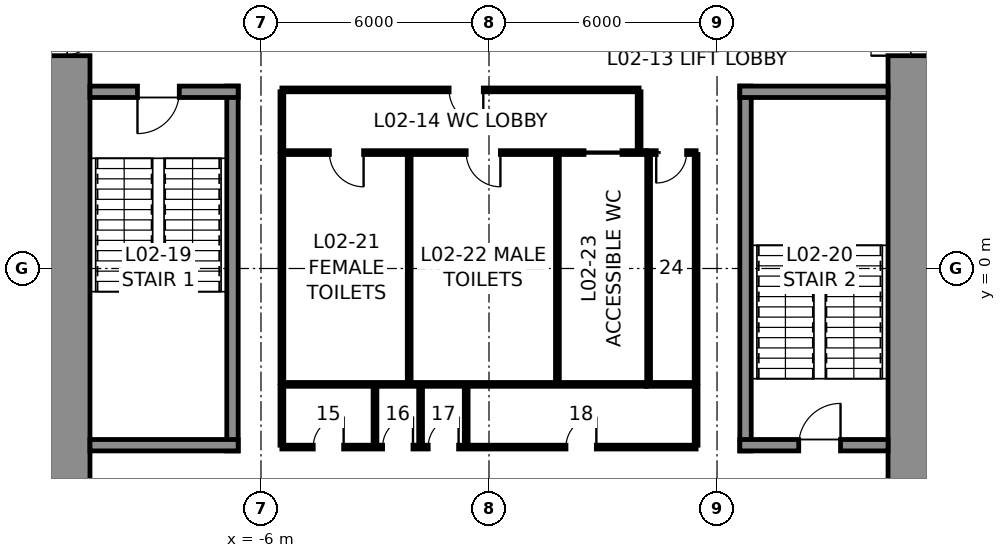
"""IFC4 building model, lengths in metres.
Left out: names, types, materials, properties, quantities, classifications, styles, units other than length and angle.
Written with IfcOpenShell. Run it as: python <this file> out.ifc"""

import sys

from ifc_helpers import new_model, si_unit, direction, frame, frame_2d, origin, place, context, subcontext, project, spatial, rectangle, extrude, element, fill, save


model = new_model("IFC4")
c1 = context("Model", 3, precision=1e-05, world=origin(), true_north=direction((0.0, 1.0)))
c2 = subcontext(c1, "Body", "Model", "MODEL_VIEW")
j1 = project(units=[si_unit("LENGTHUNIT", "METRE"), si_unit("PLANEANGLEUNIT", "RADIAN")], contexts=[c1])
p1 = place(None, origin())
s1 = spatial("IfcSite", under=j1, at=p1, CompositionType="ELEMENT")
p2 = place(p1, origin())
s2 = spatial("IfcBuilding", under=s1, at=p2, CompositionType="ELEMENT")
p3 = place(p2, frame((0.0, 0.0, 11.0)))
s3 = spatial("IfcBuildingStorey", under=s2, at=p3, CompositionType="ELEMENT", Elevation=11.0)
p4 = place(p3, frame((11.25, 10.5, 0.0), z_axis=(0.0, 0.0, 1.0), x_axis=(0.0, -1.0, 0.0)))
e1 = element("IfcWall", 1, at=p4, inside=s3, PredefinedType="SHEAR", context=c2, shape_type="SweptSolid", body=[
    extrude(rectangle(XDim=21.0, YDim=1.5, at=frame_2d((10.5, 0.0))), origin(), (0.0, 0.0, 1.0), 5.0),
])
p5 = place(p4, frame((3.7, 0.0, 0.0)))
e2 = element("IfcOpeningElement", 2, at=p5, cuts=e1, PredefinedType="OPENING", context=c2, shape_type="SweptSolid", body=[
    extrude(rectangle(XDim=1.2, YDim=2.3, at=frame_2d((0.6, 1.15))), frame((0.0, 0.76, 0.0), z_axis=(0.0, -1.0, 0.0), x_axis=(1.0, 0.0, 0.0)), (0.0, 0.0, 1.0), 1.52),
])
p6 = place(p4, frame((16.1, 0.0, 0.0)))
e3 = element("IfcOpeningElement", 3, at=p6, cuts=e1, PredefinedType="OPENING", context=c2, shape_type="SweptSolid", body=[
    extrude(rectangle(XDim=1.2, YDim=2.3, at=frame_2d((0.6, 1.15))), frame((0.0, 0.76, 0.0), z_axis=(0.0, -1.0, 0.0), x_axis=(1.0, 0.0, 0.0)), (0.0, 0.0, 1.0), 1.52),
])
p7 = place(p3, frame((-11.25, -10.5, 0.0), z_axis=(0.0, 0.0, 1.0), x_axis=(0.0, 1.0, 0.0)))
e4 = element("IfcWall", 4, at=p7, inside=s3, PredefinedType="SHEAR", context=c2, shape_type="SweptSolid", body=[
    extrude(rectangle(XDim=21.0, YDim=1.5, at=frame_2d((10.5, 0.0))), origin(), (0.0, 0.0, 1.0), 5.0),
])
p8 = place(p7, frame((16.1, 0.0, 0.0)))
e5 = element("IfcOpeningElement", 5, at=p8, cuts=e4, PredefinedType="OPENING", context=c2, shape_type="SweptSolid", body=[
    extrude(rectangle(XDim=1.2, YDim=2.3, at=frame_2d((0.6, 1.15))), frame((0.0, 0.76, 0.0), z_axis=(0.0, -1.0, 0.0), x_axis=(1.0, 0.0, 0.0)), (0.0, 0.0, 1.0), 1.52),
])
p9 = place(p7, frame((3.7, 0.0, 0.0)))
e6 = element("IfcOpeningElement", 6, at=p9, cuts=e4, PredefinedType="OPENING", context=c2, shape_type="SweptSolid", body=[
    extrude(rectangle(XDim=1.2, YDim=2.3, at=frame_2d((0.6, 1.15))), frame((0.0, 0.76, 0.0), z_axis=(0.0, -1.0, 0.0), x_axis=(1.0, 0.0, 0.0)), (0.0, 0.0, 1.0), 1.52),
])
p10 = place(p3, frame((-6.75, -4.8, 0.0), z_axis=(0.0, 0.0, 1.0), x_axis=(0.0, 1.0, 0.0)))
e7 = element("IfcWall", 7, at=p10, inside=s3, PredefinedType="SOLIDWALL", context=c2, shape_type="SweptSolid", body=[
    extrude(rectangle(XDim=9.6, YDim=0.3, at=frame_2d((4.8, 0.0))), origin(), (0.0, 0.0, 1.0), 4.75),
])
p11 = place(p3, frame((-10.5, 4.65, 0.0), z_axis=(0.0, 0.0, 1.0), x_axis=(1.0, 0.0, 0.0)))
e8 = element("IfcWall", 8, at=p11, inside=s3, PredefinedType="SOLIDWALL", context=c2, shape_type="SweptSolid", body=[
    extrude(rectangle(XDim=3.9, YDim=0.3, at=frame_2d((1.95, 0.0))), origin(), (0.0, 0.0, 1.0), 4.75),
])
p12 = place(p11, frame((1.25, 0.0, 0.0)))
e9 = element("IfcOpeningElement", 9, at=p12, cuts=e8, PredefinedType="OPENING", context=c2, shape_type="SweptSolid", body=[
    extrude(rectangle(XDim=1.1, YDim=2.3, at=frame_2d((0.55, 1.15))), frame((0.0, 0.16, 0.0), z_axis=(0.0, -1.0, 0.0), x_axis=(1.0, 0.0, 0.0)), (0.0, 0.0, 1.0), 0.32),
])
p13 = place(p3, frame((-6.6, -4.65, 0.0), z_axis=(0.0, 0.0, 1.0), x_axis=(-1.0, 0.0, 0.0)))
e10 = element("IfcWall", 10, at=p13, inside=s3, PredefinedType="SOLIDWALL", context=c2, shape_type="SweptSolid", body=[
    extrude(rectangle(XDim=3.9, YDim=0.3, at=frame_2d((1.95, 0.0))), origin(), (0.0, 0.0, 1.0), 4.75),
])
p14 = place(p3, frame((6.75, -4.8, 0.0), z_axis=(0.0, 0.0, 1.0), x_axis=(0.0, 1.0, 0.0)))
e11 = element("IfcWall", 11, at=p14, inside=s3, PredefinedType="SOLIDWALL", context=c2, shape_type="SweptSolid", body=[
    extrude(rectangle(XDim=9.6, YDim=0.3, at=frame_2d((4.8, 0.0))), origin(), (0.0, 0.0, 1.0), 4.75),
])
p15 = place(p3, frame((6.6, 4.65, 0.0), z_axis=(0.0, 0.0, 1.0), x_axis=(1.0, 0.0, 0.0)))
e12 = element("IfcWall", 12, at=p15, inside=s3, PredefinedType="SOLIDWALL", context=c2, shape_type="SweptSolid", body=[
    extrude(rectangle(XDim=3.9, YDim=0.3, at=frame_2d((1.95, 0.0))), origin(), (0.0, 0.0, 1.0), 4.75),
])
p16 = place(p3, frame((10.5, -4.65, 0.0), z_axis=(0.0, 0.0, 1.0), x_axis=(-1.0, 0.0, 0.0)))
e13 = element("IfcWall", 13, at=p16, inside=s3, PredefinedType="SOLIDWALL", context=c2, shape_type="SweptSolid", body=[
    extrude(rectangle(XDim=3.9, YDim=0.3, at=frame_2d((1.95, 0.0))), origin(), (0.0, 0.0, 1.0), 4.75),
])
p17 = place(p16, frame((1.25, 0.0, 0.0)))
e14 = element("IfcOpeningElement", 14, at=p17, cuts=e13, PredefinedType="OPENING", context=c2, shape_type="SweptSolid", body=[
    extrude(rectangle(XDim=1.1, YDim=2.3, at=frame_2d((0.55, 1.15))), frame((0.0, 0.16, 0.0), z_axis=(0.0, -1.0, 0.0), x_axis=(1.0, 0.0, 0.0)), (0.0, 0.0, 1.0), 0.32),
])
p18 = place(p3, frame((-5.45, 3.05, 0.0), z_axis=(0.0, 0.0, 1.0), x_axis=(1.0, 0.0, 0.0)))
e15 = element("IfcWall", 15, at=p18, inside=s3, PredefinedType="PARTITIONING", context=c2, shape_type="SweptSolid", body=[
    extrude(rectangle(XDim=9.6, YDim=0.1, at=frame_2d((4.8, 0.0))), origin(), (0.0, 0.0, 1.0), 4.75),
])
p19 = place(p18, frame((1.25, 0.0, 0.0)))
e16 = element("IfcOpeningElement", 16, at=p19, cuts=e15, PredefinedType="OPENING", context=c2, shape_type="SweptSolid", body=[
    extrude(rectangle(XDim=0.9, YDim=2.3, at=frame_2d((0.45, 1.15))), frame((0.0, 0.06, 0.0), z_axis=(0.0, -1.0, 0.0), x_axis=(1.0, 0.0, 0.0)), (0.0, 0.0, 1.0), 0.12),
])
p20 = place(p18, frame((4.85, 0.0, 0.0)))
e17 = element("IfcOpeningElement", 17, at=p20, cuts=e15, PredefinedType="OPENING", context=c2, shape_type="SweptSolid", body=[
    extrude(rectangle(XDim=0.9, YDim=2.3, at=frame_2d((0.45, 1.15))), frame((0.0, 0.06, 0.0), z_axis=(0.0, -1.0, 0.0), x_axis=(1.0, 0.0, 0.0)), (0.0, 0.0, 1.0), 0.12),
])
p21 = place(p18, frame((7.95, 0.0, 0.0)))
e18 = element("IfcOpeningElement", 18, at=p21, cuts=e15, PredefinedType="OPENING", context=c2, shape_type="SweptSolid", body=[
    extrude(rectangle(XDim=1.0, YDim=2.3, at=frame_2d((0.5, 1.15))), frame((0.0, 0.06, 0.0), z_axis=(0.0, -1.0, 0.0), x_axis=(1.0, 0.0, 0.0)), (0.0, 0.0, 1.0), 0.12),
])
p22 = place(p3, frame((4.15, 3.05, 0.0), z_axis=(0.0, 0.0, 1.0), x_axis=(1.0, 0.0, 0.0)))
e19 = element("IfcWall", 19, at=p22, inside=s3, PredefinedType="PARTITIONING", context=c2, shape_type="SweptSolid", body=[
    extrude(rectangle(XDim=1.3, YDim=0.1, at=frame_2d((0.65, 0.0))), origin(), (0.0, 0.0, 1.0), 4.75),
])
p23 = place(p22, frame((0.25, 0.0, 0.0)))
e20 = element("IfcOpeningElement", 20, at=p23, cuts=e19, PredefinedType="OPENING", context=c2, shape_type="SweptSolid", body=[
    extrude(rectangle(XDim=0.8, YDim=2.3, at=frame_2d((0.4, 1.15))), frame((0.0, 0.06, 0.0), z_axis=(0.0, -1.0, 0.0), x_axis=(1.0, 0.0, 0.0)), (0.0, 0.0, 1.0), 0.12),
])
p24 = place(p3, frame((4.15, -3.05, 0.0), z_axis=(0.0, 0.0, 1.0), x_axis=(-1.0, 0.0, 0.0)))
e21 = element("IfcWall", 21, at=p24, inside=s3, PredefinedType="PARTITIONING", context=c2, shape_type="SweptSolid", body=[
    extrude(rectangle(XDim=9.6, YDim=0.1, at=frame_2d((4.8, 0.0))), origin(), (0.0, 0.0, 1.0), 4.75),
])
p25 = place(p3, frame((5.45, -3.05, 0.0), z_axis=(0.0, 0.0, 1.0), x_axis=(-1.0, 0.0, 0.0)))
e22 = element("IfcWall", 22, at=p25, inside=s3, PredefinedType="PARTITIONING", context=c2, shape_type="SweptSolid", body=[
    extrude(rectangle(XDim=1.3, YDim=0.1, at=frame_2d((0.65, 0.0))), origin(), (0.0, 0.0, 1.0), 4.75),
])
for number, where, z_axis, x_axis in (
    (23, (5.45, 3.0, 0.0), (0.0, 0.0, 1.0), (0.0, -1.0, 0.0)),
    (24, (-5.45, -3.0, 0.0), (0.0, 0.0, 1.0), (0.0, 1.0, 0.0)),
    (25, (-2.1, -3.0, 0.0), (0.0, 0.0, 1.0), (0.0, 1.0, 0.0)),
    (26, (1.8, -3.0, 0.0), (0.0, 0.0, 1.0), (0.0, 1.0, 0.0)),
    (27, (4.2, -3.0, 0.0), (0.0, 0.0, 1.0), (0.0, 1.0, 0.0)),
):
    element("IfcWall", number, at=place(p3, frame(where, z_axis=z_axis, x_axis=x_axis)), inside=s3, PredefinedType="PARTITIONING", context=c2, shape_type="SweptSolid", body=[
        extrude(rectangle(XDim=6.0, YDim=0.1, at=frame_2d((3.0, 0.0))), origin(), (0.0, 0.0, 1.0), 4.75),
    ])
p26 = place(p3, frame((-5.45, 4.7, 0.0), z_axis=(0.0, 0.0, 1.0), x_axis=(1.0, 0.0, 0.0)))
e28 = element("IfcWall", 28, at=p26, inside=s3, PredefinedType="PARTITIONING", context=c2, shape_type="SweptSolid", body=[
    extrude(rectangle(XDim=9.4, YDim=0.1, at=frame_2d((4.7, 0.0))), origin(), (0.0, 0.0, 1.0), 4.75),
])
p27 = place(p26, frame((4.4, 0.0, 0.0)))
e29 = element("IfcOpeningElement", 29, at=p27, cuts=e28, PredefinedType="OPENING", context=c2, shape_type="SweptSolid", body=[
    extrude(rectangle(XDim=0.9, YDim=2.3, at=frame_2d((0.45, 1.15))), frame((0.0, 0.06, 0.0), z_axis=(0.0, -1.0, 0.0), x_axis=(1.0, 0.0, 0.0)), (0.0, 0.0, 1.0), 0.12),
])
for number, where, z_axis, x_axis in (
    (30, (-5.45, 3.1, 0.0), (0.0, 0.0, 1.0), (0.0, 1.0, 0.0)),
    (31, (3.95, 3.1, 0.0), (0.0, 0.0, 1.0), (0.0, 1.0, 0.0)),
):
    element("IfcWall", number, at=place(p3, frame(where, z_axis=z_axis, x_axis=x_axis)), inside=s3, PredefinedType="PARTITIONING", context=c2, shape_type="SweptSolid", body=[
        extrude(rectangle(XDim=1.55, YDim=0.1, at=frame_2d((0.775, 0.0))), origin(), (0.0, 0.0, 1.0), 4.75),
    ])
p28 = place(p3, frame((5.45, -4.7, 0.0), z_axis=(0.0, 0.0, 1.0), x_axis=(-1.0, 0.0, 0.0)))
e32 = element("IfcWall", 32, at=p28, inside=s3, PredefinedType="PARTITIONING", context=c2, shape_type="SweptSolid", body=[
    extrude(rectangle(XDim=10.9, YDim=0.1, at=frame_2d((5.45, 0.0))), origin(), (0.0, 0.0, 1.0), 4.75),
])
p29 = place(p28, frame((9.275, 0.0, 0.0)))
e33 = element("IfcOpeningElement", 33, at=p29, cuts=e32, PredefinedType="OPENING", context=c2, shape_type="SweptSolid", body=[
    extrude(rectangle(XDim=0.8, YDim=2.3, at=frame_2d((0.4, 1.15))), frame((0.0, 0.06, 0.0), z_axis=(0.0, -1.0, 0.0), x_axis=(1.0, 0.0, 0.0)), (0.0, 0.0, 1.0), 0.12),
])
p30 = place(p28, frame((7.45, 0.0, 0.0)))
e34 = element("IfcOpeningElement", 34, at=p30, cuts=e32, PredefinedType="OPENING", context=c2, shape_type="SweptSolid", body=[
    extrude(rectangle(XDim=0.8, YDim=2.3, at=frame_2d((0.4, 1.15))), frame((0.0, 0.06, 0.0), z_axis=(0.0, -1.0, 0.0), x_axis=(1.0, 0.0, 0.0)), (0.0, 0.0, 1.0), 0.12),
])
p31 = place(p28, frame((6.25, 0.0, 0.0)))
e35 = element("IfcOpeningElement", 35, at=p31, cuts=e32, PredefinedType="OPENING", context=c2, shape_type="SweptSolid", body=[
    extrude(rectangle(XDim=0.8, YDim=2.3, at=frame_2d((0.4, 1.15))), frame((0.0, 0.06, 0.0), z_axis=(0.0, -1.0, 0.0), x_axis=(1.0, 0.0, 0.0)), (0.0, 0.0, 1.0), 0.12),
])
p32 = place(p28, frame((2.625, 0.0, 0.0)))
e36 = element("IfcOpeningElement", 36, at=p32, cuts=e32, PredefinedType="OPENING", context=c2, shape_type="SweptSolid", body=[
    extrude(rectangle(XDim=0.8, YDim=2.3, at=frame_2d((0.4, 1.15))), frame((0.0, 0.06, 0.0), z_axis=(0.0, -1.0, 0.0), x_axis=(1.0, 0.0, 0.0)), (0.0, 0.0, 1.0), 0.12),
])
for number, where, z_axis, x_axis in (
    (37, (-5.45, -3.1, 0.0), (0.0, 0.0, 1.0), (0.0, -1.0, 0.0)),
    (38, (5.45, -3.1, 0.0), (0.0, 0.0, 1.0), (0.0, -1.0, 0.0)),
    (39, (-3.0, -3.1, 0.0), (0.0, 0.0, 1.0), (0.0, -1.0, 0.0)),
    (40, (-1.8, -3.1, 0.0), (0.0, 0.0, 1.0), (0.0, -1.0, 0.0)),
    (41, (-0.6, -3.1, 0.0), (0.0, 0.0, 1.0), (0.0, -1.0, 0.0)),
):
    element("IfcWall", number, at=place(p3, frame(where, z_axis=z_axis, x_axis=x_axis)), inside=s3, PredefinedType="PARTITIONING", context=c2, shape_type="SweptSolid", body=[
        extrude(rectangle(XDim=1.55, YDim=0.1, at=frame_2d((0.775, 0.0))), origin(), (0.0, 0.0, 1.0), 4.75),
    ])
p33 = place(p12, frame((1.1, 0.0, 0.0), z_axis=(0.0, 0.0, 1.0), x_axis=(-1.0, 0.0, 0.0)))
e42 = element("IfcDoor", 42, at=p33, inside=s3, OperationType="SINGLE_SWING_RIGHT", PredefinedType="DOOR", context=c2, shape_type="SweptSolid", body=[
    extrude(rectangle(XDim=1.1, YDim=2.3, at=frame_2d((0.55, 1.15))), frame((0.0, 0.025, 0.0), z_axis=(0.0, -1.0, 0.0), x_axis=(1.0, 0.0, 0.0)), (0.0, 0.0, 1.0), 0.05),
])
fill(e9, e42)
p34 = place(p17, frame((1.1, 0.0, 0.0), z_axis=(0.0, 0.0, 1.0), x_axis=(-1.0, 0.0, 0.0)))
e43 = element("IfcDoor", 43, at=p34, inside=s3, OperationType="SINGLE_SWING_RIGHT", PredefinedType="DOOR", context=c2, shape_type="SweptSolid", body=[
    extrude(rectangle(XDim=1.1, YDim=2.3, at=frame_2d((0.55, 1.15))), frame((0.0, 0.025, 0.0), z_axis=(0.0, -1.0, 0.0), x_axis=(1.0, 0.0, 0.0)), (0.0, 0.0, 1.0), 0.05),
])
fill(e14, e43)
p35 = place(p19, frame((0.9, 0.0, 0.0), z_axis=(0.0, 0.0, 1.0), x_axis=(-1.0, 0.0, 0.0)))
e44 = element("IfcDoor", 44, at=p35, inside=s3, OperationType="SINGLE_SWING_LEFT", PredefinedType="DOOR", context=c2, shape_type="SweptSolid", body=[
    extrude(rectangle(XDim=0.9, YDim=2.3, at=frame_2d((0.45, 1.15))), frame((0.0, 0.025, 0.0), z_axis=(0.0, -1.0, 0.0), x_axis=(1.0, 0.0, 0.0)), (0.0, 0.0, 1.0), 0.05),
])
fill(e16, e44)
p36 = place(p20, frame((0.9, 0.0, 0.0), z_axis=(0.0, 0.0, 1.0), x_axis=(-1.0, 0.0, 0.0)))
e45 = element("IfcDoor", 45, at=p36, inside=s3, OperationType="SINGLE_SWING_LEFT", PredefinedType="DOOR", context=c2, shape_type="SweptSolid", body=[
    extrude(rectangle(XDim=0.9, YDim=2.3, at=frame_2d((0.45, 1.15))), frame((0.0, 0.025, 0.0), z_axis=(0.0, -1.0, 0.0), x_axis=(1.0, 0.0, 0.0)), (0.0, 0.0, 1.0), 0.05),
])
fill(e17, e45)
p37 = place(p21, frame((1.0, 0.0, 0.0), z_axis=(0.0, 0.0, 1.0), x_axis=(-1.0, 0.0, 0.0)))
e46 = element("IfcDoor", 46, at=p37, inside=s3, OperationType="SLIDING_TO_LEFT", PredefinedType="DOOR", context=c2, shape_type="SweptSolid", body=[
    extrude(rectangle(XDim=1.0, YDim=2.3, at=frame_2d((0.5, 1.15))), frame((0.0, 0.025, 0.0), z_axis=(0.0, -1.0, 0.0), x_axis=(1.0, 0.0, 0.0)), (0.0, 0.0, 1.0), 0.05),
])
fill(e18, e46)
p38 = place(p23, frame((0.8, 0.0, 0.0), z_axis=(0.0, 0.0, 1.0), x_axis=(-1.0, 0.0, 0.0)))
e47 = element("IfcDoor", 47, at=p38, inside=s3, OperationType="SINGLE_SWING_RIGHT", PredefinedType="DOOR", context=c2, shape_type="SweptSolid", body=[
    extrude(rectangle(XDim=0.8, YDim=2.3, at=frame_2d((0.4, 1.15))), frame((0.0, 0.025, 0.0), z_axis=(0.0, -1.0, 0.0), x_axis=(1.0, 0.0, 0.0)), (0.0, 0.0, 1.0), 0.05),
])
fill(e20, e47)
p39 = place(p27, frame((0.9, 0.0, 0.0), z_axis=(0.0, 0.0, 1.0), x_axis=(-1.0, 0.0, 0.0)))
e48 = element("IfcDoor", 48, at=p39, inside=s3, OperationType="SINGLE_SWING_LEFT", PredefinedType="DOOR", context=c2, shape_type="SweptSolid", body=[
    extrude(rectangle(XDim=0.9, YDim=2.3, at=frame_2d((0.45, 1.15))), frame((0.0, 0.025, 0.0), z_axis=(0.0, -1.0, 0.0), x_axis=(1.0, 0.0, 0.0)), (0.0, 0.0, 1.0), 0.05),
])
fill(e29, e48)
p40 = place(p29, frame((0.8, 0.0, 0.0), z_axis=(0.0, 0.0, 1.0), x_axis=(-1.0, 0.0, 0.0)))
e49 = element("IfcDoor", 49, at=p40, inside=s3, OperationType="SINGLE_SWING_RIGHT", PredefinedType="DOOR", context=c2, shape_type="SweptSolid", body=[
    extrude(rectangle(XDim=0.8, YDim=2.3, at=frame_2d((0.4, 1.15))), frame((0.0, 0.025, 0.0), z_axis=(0.0, -1.0, 0.0), x_axis=(1.0, 0.0, 0.0)), (0.0, 0.0, 1.0), 0.05),
])
fill(e33, e49)
p41 = place(p30, frame((0.8, 0.0, 0.0), z_axis=(0.0, 0.0, 1.0), x_axis=(-1.0, 0.0, 0.0)))
e50 = element("IfcDoor", 50, at=p41, inside=s3, OperationType="SINGLE_SWING_RIGHT", PredefinedType="DOOR", context=c2, shape_type="SweptSolid", body=[
    extrude(rectangle(XDim=0.8, YDim=2.3, at=frame_2d((0.4, 1.15))), frame((0.0, 0.025, 0.0), z_axis=(0.0, -1.0, 0.0), x_axis=(1.0, 0.0, 0.0)), (0.0, 0.0, 1.0), 0.05),
])
fill(e34, e50)
p42 = place(p31, frame((0.8, 0.0, 0.0), z_axis=(0.0, 0.0, 1.0), x_axis=(-1.0, 0.0, 0.0)))
e51 = element("IfcDoor", 51, at=p42, inside=s3, OperationType="SINGLE_SWING_RIGHT", PredefinedType="DOOR", context=c2, shape_type="SweptSolid", body=[
    extrude(rectangle(XDim=0.8, YDim=2.3, at=frame_2d((0.4, 1.15))), frame((0.0, 0.025, 0.0), z_axis=(0.0, -1.0, 0.0), x_axis=(1.0, 0.0, 0.0)), (0.0, 0.0, 1.0), 0.05),
])
fill(e35, e51)
p43 = place(p32, frame((0.8, 0.0, 0.0), z_axis=(0.0, 0.0, 1.0), x_axis=(-1.0, 0.0, 0.0)))
e52 = element("IfcDoor", 52, at=p43, inside=s3, OperationType="SINGLE_SWING_RIGHT", PredefinedType="DOOR", context=c2, shape_type="SweptSolid", body=[
    extrude(rectangle(XDim=0.8, YDim=2.3, at=frame_2d((0.4, 1.15))), frame((0.0, 0.025, 0.0), z_axis=(0.0, -1.0, 0.0), x_axis=(1.0, 0.0, 0.0)), (0.0, 0.0, 1.0), 0.05),
])
fill(e36, e52)
p44 = place(p8, frame((1.2, 0.0, 0.0), z_axis=(0.0, 0.0, 1.0), x_axis=(-1.0, 0.0, 0.0)))
e53 = element("IfcDoor", 53, at=p44, inside=s3, OperationType="SINGLE_SWING_LEFT", PredefinedType="DOOR", context=c2, shape_type="SweptSolid", body=[
    extrude(rectangle(XDim=1.2, YDim=2.3, at=frame_2d((0.6, 1.15))), frame((0.0, 0.025, 0.0), z_axis=(0.0, -1.0, 0.0), x_axis=(1.0, 0.0, 0.0)), (0.0, 0.0, 1.0), 0.05),
])
fill(e5, e53)
p45 = place(p5, frame((1.2, 0.0, 0.0), z_axis=(0.0, 0.0, 1.0), x_axis=(-1.0, 0.0, 0.0)))
e54 = element("IfcDoor", 54, at=p45, inside=s3, OperationType="SINGLE_SWING_LEFT", PredefinedType="DOOR", context=c2, shape_type="SweptSolid", body=[
    extrude(rectangle(XDim=1.2, YDim=2.3, at=frame_2d((0.6, 1.15))), frame((0.0, 0.025, 0.0), z_axis=(0.0, -1.0, 0.0), x_axis=(1.0, 0.0, 0.0)), (0.0, 0.0, 1.0), 0.05),
])
fill(e2, e54)
save(model, sys.argv[1])
